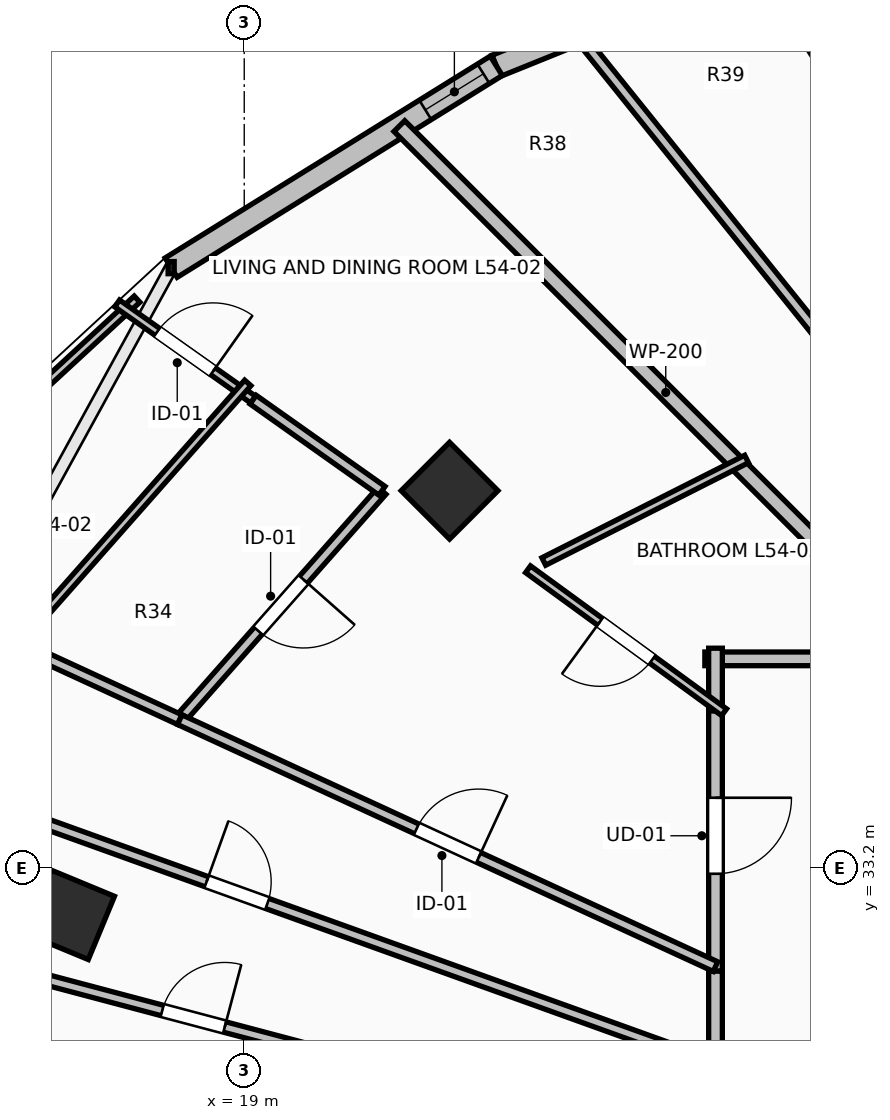
"""IFC4 building model, lengths in metres.
Left out: names, types, materials, properties, quantities, classifications, styles, units other than length and angle.
Written with IfcOpenShell. Run it as: python <this file> out.ifc"""

import sys

from ifc_helpers import new_model, si_unit, direction, frame, frame_2d, origin, origin_2d, place, context, subcontext, project, spatial, rectangle, extrude, element, fill, save


model = new_model("IFC4")
c1 = context("Model", 3, precision=1e-05, world=origin(), true_north=direction((0.0, 1.0)))
c2 = subcontext(c1, "Body", "Model", "MODEL_VIEW")
j1 = project(units=[si_unit("LENGTHUNIT", "METRE"), si_unit("PLANEANGLEUNIT", "RADIAN")], contexts=[c1])
p1 = place(None, origin())
s1 = spatial("IfcSite", under=j1, at=p1, CompositionType="ELEMENT")
p2 = place(p1, origin())
s2 = spatial("IfcBuilding", under=s1, at=p2, CompositionType="ELEMENT")
p3 = place(p2, frame((0.0, 0.0, 200.1)))
s3 = spatial("IfcBuildingStorey", under=s2, at=p3, CompositionType="ELEMENT", Elevation=200.1)
for number, where, z_axis, x_axis in (
    (1, (21.701, 38.162, 0.0), (0.0, 0.0, 1.0), (-0.707, 0.707, 0.0)),
    (2, (16.705, 32.582, 0.0), (0.0, 0.0, 1.0), (-0.924, 0.383, 0.0)),
):
    element("IfcColumn", number, at=place(p3, frame(where, z_axis=z_axis, x_axis=x_axis)), inside=s3, PredefinedType="COLUMN", context=c2, shape_type="SweptSolid", body=[
        extrude(rectangle(XDim=0.9, YDim=0.9, at=origin_2d()), origin(), (0.0, 0.0, 1.0), 3.55),
    ])
p4 = place(p3, frame((27.197, 45.725, 0.0), z_axis=(0.0, 0.0, 1.0), x_axis=(-0.927111094334, -0.374786630981, 0.0)))
e3 = element("IfcWall", 3, at=p4, inside=s3, PredefinedType="STANDARD", context=c2, shape_type="SweptSolid", body=[
    extrude(rectangle(XDim=5.264, YDim=0.3, at=frame_2d((2.632, 0.0))), origin(), (0.0, 0.0, 1.0), 3.29),
])
p5 = place(p4, frame((0.258, 0.0, 0.85)))
e4 = element("IfcOpeningElement", 4, at=p5, cuts=e3, PredefinedType="OPENING", context=c2, shape_type="SweptSolid", body=[
    extrude(rectangle(XDim=0.9, YDim=1.8, at=frame_2d((0.45, 0.9))), frame((0.0, 0.165, 0.0), z_axis=(0.0, -1.0, 0.0), x_axis=(1.0, 0.0, 0.0)), (0.0, 0.0, 1.0), 0.33),
])
p6 = place(p4, frame((2.032, 0.0, 0.85)))
e5 = element("IfcOpeningElement", 5, at=p6, cuts=e3, PredefinedType="OPENING", context=c2, shape_type="SweptSolid", body=[
    extrude(rectangle(XDim=1.2, YDim=1.95, at=frame_2d((0.6, 0.975))), frame((0.0, 0.165, 0.0), z_axis=(0.0, -1.0, 0.0), x_axis=(1.0, 0.0, 0.0)), (0.0, 0.0, 1.0), 0.33),
])
p7 = place(p3, frame((22.316, 43.752, 0.0), z_axis=(0.0, 0.0, 1.0), x_axis=(-0.849647657754, -0.527350791858, 0.0)))
e6 = element("IfcWall", 6, at=p7, inside=s3, PredefinedType="STANDARD", context=c2, shape_type="SweptSolid", body=[
    extrude(rectangle(XDim=5.035, YDim=0.3, at=frame_2d((2.518, 0.0))), origin(), (0.0, 0.0, 1.0), 3.29),
])
p8 = place(p7, frame((0.199, 0.0, 0.85)))
e7 = element("IfcOpeningElement", 7, at=p8, cuts=e6, PredefinedType="OPENING", context=c2, shape_type="SweptSolid", body=[
    extrude(rectangle(XDim=0.9, YDim=1.8, at=frame_2d((0.45, 0.9))), frame((0.0, 0.165, 0.0), z_axis=(0.0, -1.0, 0.0), x_axis=(1.0, 0.0, 0.0)), (0.0, 0.0, 1.0), 0.33),
])
p9 = place(p3, frame((25.2, 35.404, 0.0), z_axis=(0.0, 0.0, 1.0), x_axis=(0.0, -1.0, 0.0)))
e8 = element("IfcWall", 8, at=p9, inside=s3, PredefinedType="PARTITIONING", context=c2, shape_type="SweptSolid", body=[
    extrude(rectangle(XDim=3.563, YDim=0.18, at=frame_2d((1.781, 0.0))), origin(), (0.0, 0.0, 1.0), 2.482),
])
p10 = place(p9, frame((1.281, 0.0, 0.0)))
e9 = element("IfcOpeningElement", 9, at=p10, cuts=e8, PredefinedType="OPENING", context=c2, shape_type="SweptSolid", body=[
    extrude(rectangle(XDim=1.0, YDim=2.15, at=frame_2d((0.5, 1.075))), frame((0.0, 0.105, 0.0), z_axis=(0.0, -1.0, 0.0), x_axis=(1.0, 0.0, 0.0)), (0.0, 0.0, 1.0), 0.21),
])
p11 = place(p3, frame((28.105, 35.95, 0.0), z_axis=(0.0, 0.0, 1.0), x_axis=(-1.0, 0.0, 0.0)))
e10 = element("IfcWall", 10, at=p11, inside=s3, PredefinedType="PARTITIONING", context=c2, shape_type="SweptSolid", body=[
    extrude(rectangle(XDim=3.045, YDim=0.18, at=frame_2d((1.522, 0.0))), origin(), (0.0, 0.0, 1.0), 2.482),
])
p12 = place(p3, frame((25.2, 36.09, 0.0), z_axis=(0.0, 0.0, 1.0), x_axis=(0.0, -1.0, 0.0)))
e11 = element("IfcWall", 11, at=p12, inside=s3, PredefinedType="PARTITIONING", context=c2, shape_type="SweptSolid", body=[
    extrude(rectangle(XDim=0.826, YDim=0.18, at=frame_2d((0.413, 0.0))), origin(), (0.0, 0.0, 1.0), 2.482),
])
p13 = place(p3, frame((25.2, 31.841, 0.0), z_axis=(0.0, 0.0, 1.0), x_axis=(0.0, -1.0, 0.0)))
e12 = element("IfcWall", 12, at=p13, inside=s3, PredefinedType="PARTITIONING", context=c2, shape_type="SweptSolid", body=[
    extrude(rectangle(XDim=1.293, YDim=0.18, at=frame_2d((0.646, 0.0))), origin(), (0.0, 0.0, 1.0), 3.29),
])
p14 = place(p3, frame((25.749, 45.138, 0.0), z_axis=(0.0, 0.0, 1.0), x_axis=(0.539168632786, -0.842197830335, 0.0)))
e13 = element("IfcWall", 13, at=p14, inside=s3, PredefinedType="PARTITIONING", context=c2, shape_type="SweptSolid", body=[
    extrude(rectangle(XDim=10.909, YDim=0.14, at=frame_2d((5.455, 0.0))), origin(), (0.0, 0.0, 1.0), 2.482),
])
p15 = place(p3, frame((23.378, 44.178, 0.0), z_axis=(0.0, 0.0, 1.0), x_axis=(0.626756813732, -0.779214923137, 0.0)))
e14 = element("IfcWall", 14, at=p15, inside=s3, PredefinedType="PARTITIONING", context=c2, shape_type="SweptSolid", body=[
    extrude(rectangle(XDim=10.559, YDim=0.14, at=frame_2d((5.28, 0.0))), origin(), (0.0, 0.0, 1.0), 2.482),
])
p16 = place(p3, frame((21.041, 42.959, 0.0), z_axis=(0.0, 0.0, 1.0), x_axis=(0.707106781187, -0.707106781187, 0.0)))
e15 = element("IfcWall", 15, at=p16, inside=s3, PredefinedType="PARTITIONING", context=c2, shape_type="SweptSolid", body=[
    extrude(rectangle(XDim=9.912, YDim=0.2, at=frame_2d((4.956, 0.0))), origin(), (0.0, 0.0, 1.0), 2.482),
])
p17 = place(p3, frame((25.313, 35.248, 0.0), z_axis=(0.0, 0.0, 1.0), x_axis=(-0.807968083988, 0.58922625133, 0.0)))
e16 = element("IfcWall", 16, at=p17, inside=s3, PredefinedType="PARTITIONING", context=c2, shape_type="SweptSolid", body=[
    extrude(rectangle(XDim=3.192, YDim=0.11, at=frame_2d((1.596, 0.0))), origin(), (0.0, 0.0, 1.0), 2.482),
])
p18 = place(p17, frame((1.171, 0.0, 0.0)))
e17 = element("IfcOpeningElement", 17, at=p18, cuts=e16, PredefinedType="OPENING", context=c2, shape_type="SweptSolid", body=[
    extrude(rectangle(XDim=0.85, YDim=2.1, at=frame_2d((0.425, 1.05))), frame((0.0, 0.07, 0.0), z_axis=(0.0, -1.0, 0.0), x_axis=(1.0, 0.0, 0.0)), (0.0, 0.0, 1.0), 0.14),
])
p19 = place(p3, frame((22.941, 37.231, 0.0), z_axis=(0.0, 0.0, 1.0), x_axis=(0.892507731149, 0.451032094024, 0.0)))
e18 = element("IfcWall", 18, at=p19, inside=s3, PredefinedType="PARTITIONING", context=c2, shape_type="SweptSolid", body=[
    extrude(rectangle(XDim=2.989, YDim=0.11, at=frame_2d((1.495, 0.0))), origin(), (0.0, 0.0, 1.0), 2.482),
])
p20 = place(p3, frame((17.59, 40.682, 0.0), z_axis=(0.0, 0.0, 1.0), x_axis=(-0.734861902375, -0.678216768031, 0.0)))
e19 = element("IfcWall", 19, at=p20, inside=s3, PredefinedType="PARTITIONING", context=c2, shape_type="SweptSolid", body=[
    extrude(rectangle(XDim=4.323, YDim=0.11, at=frame_2d((2.162, 0.0))), origin(), (0.0, 0.0, 1.0), 3.29),
])
p21 = place(p3, frame((17.328, 40.626, 0.0), z_axis=(0.0, 0.0, 1.0), x_axis=(0.816448938693, -0.577417639588, 0.0)))
e20 = element("IfcWall", 20, at=p21, inside=s3, PredefinedType="PARTITIONING", context=c2, shape_type="SweptSolid", body=[
    extrude(rectangle(XDim=2.192, YDim=0.11, at=frame_2d((1.096, 0.0))), origin(), (0.0, 0.0, 1.0), 3.29),
])
p22 = place(p21, frame((0.646, 0.0, 0.0)))
e21 = element("IfcOpeningElement", 21, at=p22, cuts=e20, PredefinedType="OPENING", context=c2, shape_type="SweptSolid", body=[
    extrude(rectangle(XDim=0.9, YDim=2.1, at=frame_2d((0.45, 1.05))), frame((0.0, 0.07, 0.0), z_axis=(0.0, -1.0, 0.0), x_axis=(1.0, 0.0, 0.0)), (0.0, 0.0, 1.0), 0.14),
])
p23 = place(p3, frame((20.812, 38.161, 0.0), z_axis=(0.0, 0.0, 1.0), x_axis=(-0.662063683649, -0.749447582418, 0.0)))
e22 = element("IfcWall", 22, at=p23, inside=s3, PredefinedType="PARTITIONING", context=c2, shape_type="SweptSolid", body=[
    extrude(rectangle(XDim=4.018, YDim=0.14, at=frame_2d((2.009, 0.0))), origin(), (0.0, 0.0, 1.0), 3.29),
])
p24 = place(p23, frame((1.559, 0.0, 0.0)))
e23 = element("IfcOpeningElement", 23, at=p24, cuts=e22, PredefinedType="OPENING", context=c2, shape_type="SweptSolid", body=[
    extrude(rectangle(XDim=0.9, YDim=2.1, at=frame_2d((0.45, 1.05))), frame((0.0, 0.085, 0.0), z_axis=(0.0, -1.0, 0.0), x_axis=(1.0, 0.0, 0.0)), (0.0, 0.0, 1.0), 0.17),
])
p25 = place(p3, frame((18.152, 35.15, 0.0), z_axis=(0.0, 0.0, 1.0), x_axis=(-0.908192094718, 0.418553603607, 0.0)))
e24 = element("IfcWall", 24, at=p25, inside=s3, PredefinedType="PARTITIONING", context=c2, shape_type="SweptSolid", body=[
    extrude(rectangle(XDim=2.363, YDim=0.14, at=frame_2d((1.182, 0.0))), origin(), (0.0, 0.0, 1.0), 3.29),
])
p26 = place(p3, frame((19.117, 39.36, 0.0), z_axis=(0.0, 0.0, 1.0), x_axis=(0.816315567802, -0.577606175316, 0.0)))
e25 = element("IfcWall", 25, at=p26, inside=s3, PredefinedType="PARTITIONING", context=c2, shape_type="SweptSolid", body=[
    extrude(rectangle(XDim=2.076, YDim=0.14, at=frame_2d((1.038, 0.0))), origin(), (0.0, 0.0, 1.0), 3.29),
])
p27 = place(p3, frame((18.152, 35.15, 0.0), z_axis=(0.0, 0.0, 1.0), x_axis=(0.908152637685, -0.418639208227, 0.0)))
e26 = element("IfcWall", 26, at=p27, inside=s3, PredefinedType="PARTITIONING", context=c2, shape_type="SweptSolid", body=[
    extrude(rectangle(XDim=7.761, YDim=0.14, at=frame_2d((3.88, 0.0))), origin(), (0.0, 0.0, 1.0), 2.824),
])
p28 = place(p27, frame((3.43, 0.0, 0.0)))
e27 = element("IfcOpeningElement", 27, at=p28, cuts=e26, PredefinedType="OPENING", context=c2, shape_type="SweptSolid", body=[
    extrude(rectangle(XDim=0.9, YDim=2.1, at=frame_2d((0.45, 1.05))), frame((0.0, 0.085, 0.0), z_axis=(0.0, -1.0, 0.0), x_axis=(1.0, 0.0, 0.0)), (0.0, 0.0, 1.0), 0.17),
])
p29 = place(p3, frame((15.913, 36.034, 0.0), z_axis=(0.0, 0.0, 1.0), x_axis=(0.662189711464, 0.749336230294, 0.0)))
e28 = element("IfcWall", 28, at=p29, inside=s3, PredefinedType="PARTITIONING", context=c2, shape_type="SweptSolid", body=[
    extrude(rectangle(XDim=4.732, YDim=0.11, at=frame_2d((2.366, 0.0))), origin(), (0.0, 0.0, 1.0), 3.29),
])
p30 = place(p3, frame((12.609, 35.141, 0.0), z_axis=(0.0, 0.0, 1.0), x_axis=(0.940877411069, -0.338747246985, 0.0)))
e29 = element("IfcWall", 29, at=p30, inside=s3, PredefinedType="PARTITIONING", context=c2, shape_type="SweptSolid", body=[
    extrude(rectangle(XDim=13.382, YDim=0.14, at=frame_2d((6.691, 0.0))), origin(), (0.0, 0.0, 1.0), 2.824),
])
p31 = place(p30, frame((6.266, 0.0, 0.0)))
e30 = element("IfcOpeningElement", 30, at=p31, cuts=e29, PredefinedType="OPENING", context=c2, shape_type="SweptSolid", body=[
    extrude(rectangle(XDim=0.85, YDim=2.1, at=frame_2d((0.425, 1.05))), frame((0.0, 0.085, 0.0), z_axis=(0.0, -1.0, 0.0), x_axis=(1.0, 0.0, 0.0)), (0.0, 0.0, 1.0), 0.17),
])
p32 = place(p3, frame((11.465, 33.036, 0.0), z_axis=(0.0, 0.0, 1.0), x_axis=(0.966598137313, -0.256296782934, 0.0)))
e31 = element("IfcWall", 31, at=p32, inside=s3, PredefinedType="PARTITIONING", context=c2, shape_type="SweptSolid", body=[
    extrude(rectangle(XDim=14.209, YDim=0.14, at=frame_2d((7.105, 0.0))), origin(), (0.0, 0.0, 1.0), 2.482),
])
p33 = place(p32, frame((6.68, 0.0, 0.0)))
e32 = element("IfcOpeningElement", 32, at=p33, cuts=e31, PredefinedType="OPENING", context=c2, shape_type="SweptSolid", body=[
    extrude(rectangle(XDim=0.85, YDim=2.1, at=frame_2d((0.425, 1.05))), frame((0.0, 0.085, 0.0), z_axis=(0.0, -1.0, 0.0), x_axis=(1.0, 0.0, 0.0)), (0.0, 0.0, 1.0), 0.17),
])
p34 = place(p8, origin())
e33 = element("IfcWindow", 33, at=p34, inside=s3, PartitioningType="SINGLE_PANEL", PredefinedType="WINDOW", context=c2, shape_type="SweptSolid", body=[
    extrude(rectangle(XDim=0.9, YDim=1.8, at=frame_2d((0.45, 0.9))), frame((0.0, 0.03, 0.0), z_axis=(0.0, -1.0, 0.0), x_axis=(1.0, 0.0, 0.0)), (0.0, 0.0, 1.0), 0.06),
])
fill(e7, e33)
p35 = place(p10, origin())
e34 = element("IfcDoor", 34, at=p35, inside=s3, OperationType="SINGLE_SWING_LEFT", PredefinedType="DOOR", context=c2, shape_type="SweptSolid", body=[
    extrude(rectangle(XDim=1.0, YDim=2.15, at=frame_2d((0.5, 1.075))), frame((0.0, 0.025, 0.0), z_axis=(0.0, -1.0, 0.0), x_axis=(1.0, 0.0, 0.0)), (0.0, 0.0, 1.0), 0.05),
])
fill(e9, e34)
p36 = place(p18, origin())
e35 = element("IfcDoor", 35, at=p36, inside=s3, OperationType="SINGLE_SWING_RIGHT", PredefinedType="DOOR", context=c2, shape_type="SweptSolid", body=[
    extrude(rectangle(XDim=0.85, YDim=2.1, at=frame_2d((0.425, 1.05))), frame((0.0, 0.025, 0.0), z_axis=(0.0, -1.0, 0.0), x_axis=(1.0, 0.0, 0.0)), (0.0, 0.0, 1.0), 0.05),
])
fill(e17, e35)
p37 = place(p22, origin())
e36 = element("IfcDoor", 36, at=p37, inside=s3, OperationType="SINGLE_SWING_RIGHT", PredefinedType="DOOR", context=c2, shape_type="SweptSolid", body=[
    extrude(rectangle(XDim=0.9, YDim=2.1, at=frame_2d((0.45, 1.05))), frame((0.0, 0.025, 0.0), z_axis=(0.0, -1.0, 0.0), x_axis=(1.0, 0.0, 0.0)), (0.0, 0.0, 1.0), 0.05),
])
fill(e21, e36)
p38 = place(p24, origin())
e37 = element("IfcDoor", 37, at=p38, inside=s3, OperationType="SINGLE_SWING_LEFT", PredefinedType="DOOR", context=c2, shape_type="SweptSolid", body=[
    extrude(rectangle(XDim=0.9, YDim=2.1, at=frame_2d((0.45, 1.05))), frame((0.0, 0.025, 0.0), z_axis=(0.0, -1.0, 0.0), x_axis=(1.0, 0.0, 0.0)), (0.0, 0.0, 1.0), 0.05),
])
fill(e23, e37)
p39 = place(p28, origin())
e38 = element("IfcDoor", 38, at=p39, inside=s3, OperationType="SINGLE_SWING_RIGHT", PredefinedType="DOOR", context=c2, shape_type="SweptSolid", body=[
    extrude(rectangle(XDim=0.9, YDim=2.1, at=frame_2d((0.45, 1.05))), frame((0.0, 0.025, 0.0), z_axis=(0.0, -1.0, 0.0), x_axis=(1.0, 0.0, 0.0)), (0.0, 0.0, 1.0), 0.05),
])
fill(e27, e38)
p40 = place(p31, origin())
e39 = element("IfcDoor", 39, at=p40, inside=s3, OperationType="SINGLE_SWING_LEFT", PredefinedType="DOOR", context=c2, shape_type="SweptSolid", body=[
    extrude(rectangle(XDim=0.85, YDim=2.1, at=frame_2d((0.425, 1.05))), frame((0.0, 0.025, 0.0), z_axis=(0.0, -1.0, 0.0), x_axis=(1.0, 0.0, 0.0)), (0.0, 0.0, 1.0), 0.05),
])
fill(e30, e39)
p41 = place(p33, origin())
e40 = element("IfcDoor", 40, at=p41, inside=s3, OperationType="SINGLE_SWING_RIGHT", PredefinedType="DOOR", context=c2, shape_type="SweptSolid", body=[
    extrude(rectangle(XDim=0.85, YDim=2.1, at=frame_2d((0.425, 1.05))), frame((0.0, 0.025, 0.0), z_axis=(0.0, -1.0, 0.0), x_axis=(1.0, 0.0, 0.0)), (0.0, 0.0, 1.0), 0.05),
])
fill(e32, e40)
save(model, sys.argv[1])
